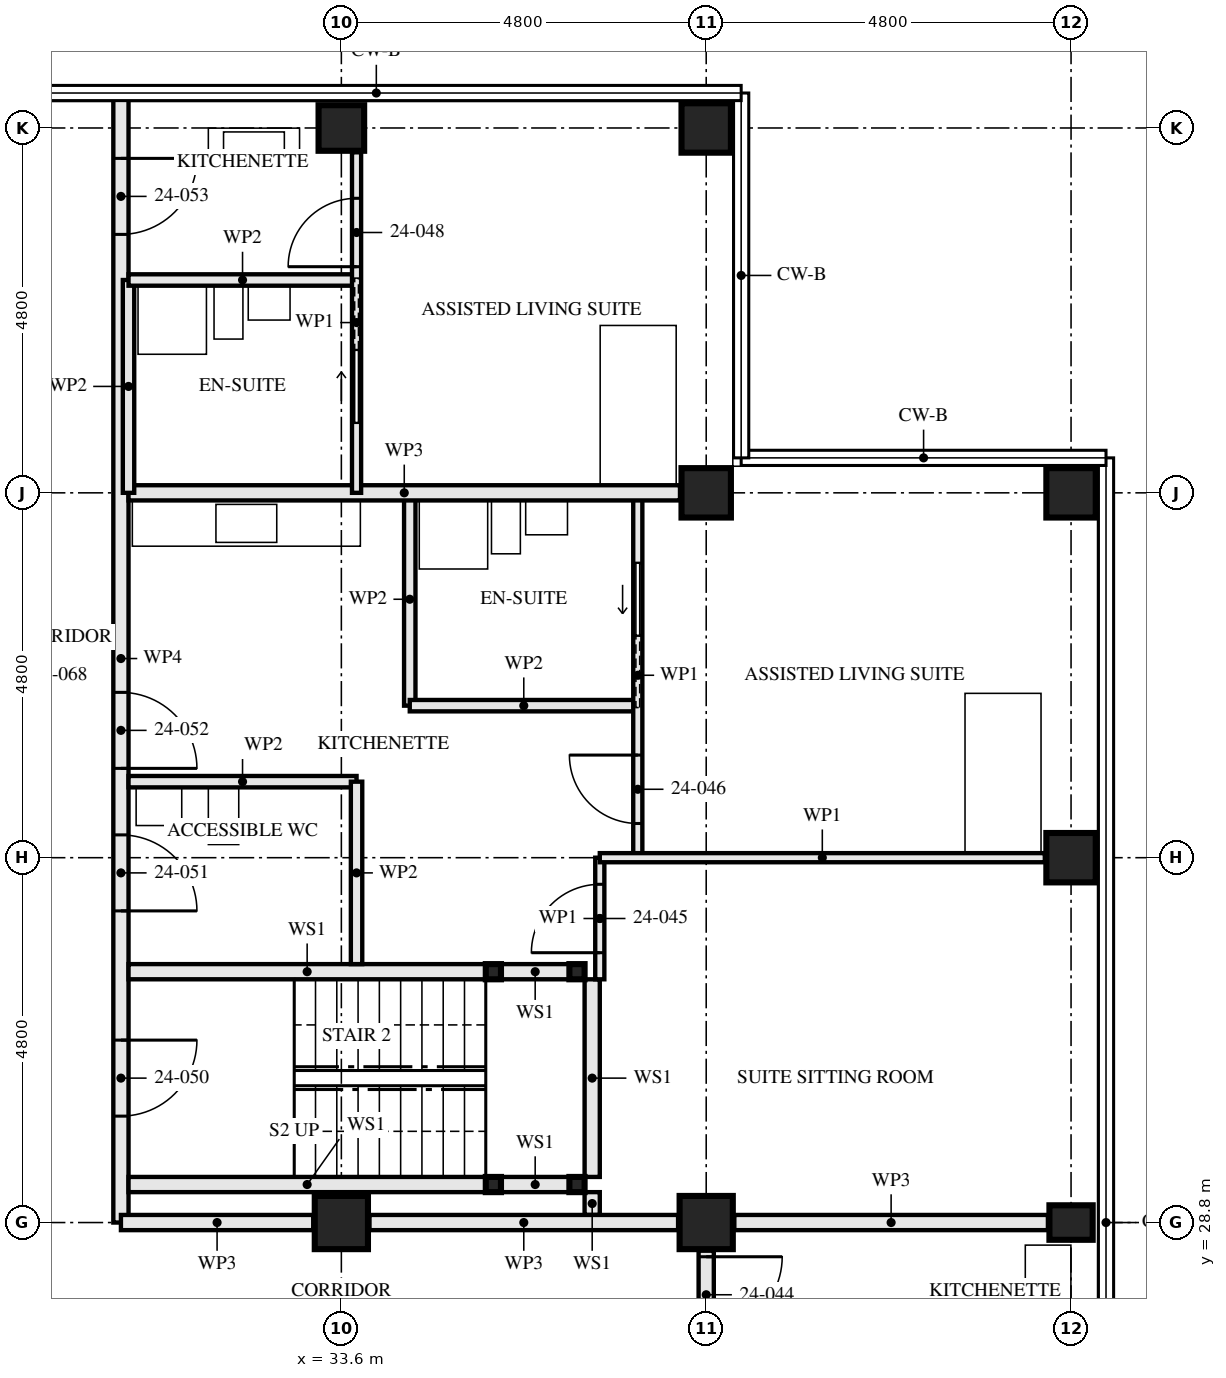
"""IFC4 building model, lengths in metres.
Left out: names, types, materials, properties, quantities, classifications, styles, units other than length and angle.
Written with IfcOpenShell. Run it as: python <this file> out.ifc"""

import sys

from ifc_helpers import new_model, si_unit, direction, frame, frame_2d, origin, origin_2d, place, context, subcontext, project, spatial, rectangle, hollow_rectangle, i_section, extrude, element, fill, save


model = new_model("IFC4")
c1 = context("Model", 3, precision=1e-05, world=origin(), true_north=direction((0.0, 1.0)))
c2 = subcontext(c1, "Body", "Model", "MODEL_VIEW")
j1 = project(units=[si_unit("LENGTHUNIT", "METRE"), si_unit("PLANEANGLEUNIT", "RADIAN")], contexts=[c1])
p1 = place(None, origin())
s1 = spatial("IfcSite", under=j1, at=p1, CompositionType="ELEMENT")
p2 = place(p1, origin())
s2 = spatial("IfcBuilding", under=s1, at=p2, CompositionType="ELEMENT")
p3 = place(p2, frame((0.0, 0.0, 91.0)))
s3 = spatial("IfcBuildingStorey", under=s2, at=p3, CompositionType="ELEMENT", Elevation=91.0)
p4 = place(p3, frame((33.6, 28.8, 0.0), z_axis=(0.0, 0.0, 1.0), x_axis=(0.0, 1.0, 0.0)))
e1 = element("IfcColumn", 1, at=p4, inside=s3, PredefinedType="COLUMN", context=c2, shape_type="SweptSolid", body=[
    extrude(hollow_rectangle(XDim=0.7, YDim=0.7, WallThickness=0.06, at=origin_2d()), origin(), (0.0, 0.0, 1.0), 3.5),
])
p5 = place(p3, frame((33.6, 43.2, 0.0), z_axis=(0.0, 0.0, 1.0), x_axis=(0.0, 1.0, 0.0)))
e2 = element("IfcColumn", 2, at=p5, inside=s3, PredefinedType="COLUMN", context=c2, shape_type="SweptSolid", body=[
    extrude(hollow_rectangle(XDim=0.6, YDim=0.6, WallThickness=0.08, at=origin_2d()), origin(), (0.0, 0.0, 1.0), 3.5),
])
p6 = place(p3, frame((38.4, 28.8, 0.0), z_axis=(0.0, 0.0, 1.0), x_axis=(0.0, 1.0, 0.0)))
e3 = element("IfcColumn", 3, at=p6, inside=s3, PredefinedType="COLUMN", context=c2, shape_type="SweptSolid", body=[
    extrude(hollow_rectangle(XDim=0.7, YDim=0.7, WallThickness=0.06, at=origin_2d()), origin(), (0.0, 0.0, 1.0), 3.5),
])
for number, where, z_axis, x_axis in (
    (4, (38.4, 38.4, 0.0), (0.0, 0.0, 1.0), (0.0, 1.0, 0.0)),
    (5, (38.4, 43.2, 0.0), (0.0, 0.0, 1.0), (0.0, 1.0, 0.0)),
):
    element("IfcColumn", number, at=place(p3, frame(where, z_axis=z_axis, x_axis=x_axis)), inside=s3, PredefinedType="COLUMN", context=c2, shape_type="SweptSolid", body=[
        extrude(hollow_rectangle(XDim=0.65, YDim=0.65, WallThickness=0.08, at=origin_2d()), origin(), (0.0, 0.0, 1.0), 3.5),
    ])
p7 = place(p3, frame((43.2, 28.8, 0.0), z_axis=(0.0, 0.0, 1.0), x_axis=(0.0, 1.0, 0.0)))
e6 = element("IfcColumn", 6, at=p7, inside=s3, PredefinedType="COLUMN", context=c2, shape_type="SweptSolid", body=[
    extrude(i_section(OverallWidth=0.454, OverallDepth=0.569, WebThickness=0.078, FlangeThickness=0.125, FilletRadius=0.015, at=origin_2d()), origin(), (0.0, 0.0, 1.0), 3.5),
])
for number, where, z_axis, x_axis in (
    (7, (43.2, 33.6, 0.0), (0.0, 0.0, 1.0), (1.0, 0.0, 0.0)),
    (8, (43.2, 38.4, 0.0), (0.0, 0.0, 1.0), (0.0, 1.0, 0.0)),
):
    element("IfcColumn", number, at=place(p3, frame(where, z_axis=z_axis, x_axis=x_axis)), inside=s3, PredefinedType="COLUMN", context=c2, shape_type="SweptSolid", body=[
        extrude(hollow_rectangle(XDim=0.65, YDim=0.65, WallThickness=0.08, at=origin_2d()), origin(), (0.0, 0.0, 1.0), 3.5),
    ])
for number, where, z_axis, x_axis in (
    (9, (36.7, 29.3, 0.0), (0.0, 0.0, 1.0), (1.0, 0.0, 0.0)),
    (10, (36.7, 32.1, 0.0), (0.0, 0.0, 1.0), (1.0, 0.0, 0.0)),
    (11, (35.6, 29.3, 0.0), (0.0, 0.0, 1.0), (1.0, 0.0, 0.0)),
    (12, (35.6, 32.1, 0.0), (0.0, 0.0, 1.0), (1.0, 0.0, 0.0)),
):
    element("IfcColumn", number, at=place(p3, frame(where, z_axis=z_axis, x_axis=x_axis)), inside=s3, PredefinedType="COLUMN", context=c2, shape_type="SweptSolid", body=[
        extrude(hollow_rectangle(XDim=0.2, YDim=0.2, WallThickness=0.008, at=origin_2d()), origin(), (0.0, 0.0, 1.0), 3.33),
    ])
p8 = place(p3, frame((38.4, 26.8, 0.0), z_axis=(0.0, 0.0, 1.0), x_axis=(0.0, 1.0, 0.0)))
e13 = element("IfcWall", 13, at=p8, inside=s3, PredefinedType="PARTITIONING", context=c2, shape_type="SweptSolid", body=[
    extrude(rectangle(XDim=1.63, YDim=0.2, at=frame_2d((0.815, 0.0))), origin(), (0.0, 0.0, 1.0), 3.33),
])
p9 = place(p8, frame((0.55, 0.0, 0.0)))
e14 = element("IfcOpeningElement", 14, at=p9, cuts=e13, PredefinedType="OPENING", context=c2, shape_type="SweptSolid", body=[
    extrude(rectangle(XDim=1.0, YDim=2.1, at=frame_2d((0.5, 1.05))), frame((0.0, 0.111, 0.0), z_axis=(0.0, -1.0, 0.0), x_axis=(1.0, 0.0, 0.0)), (0.0, 0.0, 1.0), 0.221),
])
p10 = place(p3, frame((36.6, 29.3, 0.0), z_axis=(0.0, 0.0, 1.0), x_axis=(-1.0, 0.0, 0.0)))
e15 = element("IfcWall", 15, at=p10, inside=s3, PredefinedType="SOLIDWALL", context=c2, shape_type="SweptSolid", body=[
    extrude(rectangle(XDim=0.9, YDim=0.2, at=frame_2d((0.45, 0.0))), origin(), (0.0, 0.0, 1.0), 2.99),
])
p11 = place(p3, frame((35.5, 29.3, 0.0), z_axis=(0.0, 0.0, 1.0), x_axis=(-1.0, 0.0, 0.0)))
e16 = element("IfcWall", 16, at=p11, inside=s3, PredefinedType="SOLIDWALL", context=c2, shape_type="SweptSolid", body=[
    extrude(rectangle(XDim=4.7, YDim=0.2, at=frame_2d((2.35, 0.0))), origin(), (0.0, 0.0, 1.0), 2.99),
])
p12 = place(p3, frame((36.6, 32.1, 0.0), z_axis=(0.0, 0.0, 1.0), x_axis=(-1.0, 0.0, 0.0)))
e17 = element("IfcWall", 17, at=p12, inside=s3, PredefinedType="SOLIDWALL", context=c2, shape_type="SweptSolid", body=[
    extrude(rectangle(XDim=0.9, YDim=0.2, at=frame_2d((0.45, 0.0))), origin(), (0.0, 0.0, 1.0), 2.99),
])
p13 = place(p3, frame((35.5, 32.1, 0.0), z_axis=(0.0, 0.0, 1.0), x_axis=(-1.0, 0.0, 0.0)))
e18 = element("IfcWall", 18, at=p13, inside=s3, PredefinedType="SOLIDWALL", context=c2, shape_type="SweptSolid", body=[
    extrude(rectangle(XDim=4.7, YDim=0.2, at=frame_2d((2.35, 0.0))), origin(), (0.0, 0.0, 1.0), 2.99),
])
p14 = place(p3, frame((36.9, 28.9, 0.0), z_axis=(0.0, 0.0, 1.0), x_axis=(0.0, 1.0, 0.0)))
e19 = element("IfcWall", 19, at=p14, inside=s3, PredefinedType="SOLIDWALL", context=c2, shape_type="SweptSolid", body=[
    extrude(rectangle(XDim=0.3, YDim=0.2, at=frame_2d((0.15, 0.0))), origin(), (0.0, 0.0, 1.0), 3.33),
])
p15 = place(p3, frame((36.9, 29.4, 0.0), z_axis=(0.0, 0.0, 1.0), x_axis=(0.0, 1.0, 0.0)))
e20 = element("IfcWall", 20, at=p15, inside=s3, PredefinedType="SOLIDWALL", context=c2, shape_type="SweptSolid", body=[
    extrude(rectangle(XDim=2.6, YDim=0.2, at=frame_2d((1.3, 0.0))), origin(), (0.0, 0.0, 1.0), 3.33),
])
p16 = place(p3, frame((33.8, 32.2, 0.0), z_axis=(0.0, 0.0, 1.0), x_axis=(0.0, 1.0, 0.0)))
e21 = element("IfcWall", 21, at=p16, inside=s3, PredefinedType="PARTITIONING", context=c2, shape_type="SweptSolid", body=[
    extrude(rectangle(XDim=2.4, YDim=0.15, at=frame_2d((1.2, 0.0))), origin(), (0.0, 0.0, 1.0), 2.55),
])
for number, where, z_axis, x_axis in (
    (22, (33.8, 34.6, 0.0), (0.0, 0.0, 1.0), (-1.0, 0.0, 0.0)),
    (23, (37.5, 35.6, 0.0), (0.0, 0.0, 1.0), (-1.0, 0.0, 0.0)),
):
    element("IfcWall", number, at=place(p3, frame(where, z_axis=z_axis, x_axis=x_axis)), inside=s3, PredefinedType="PARTITIONING", context=c2, shape_type="SweptSolid", body=[
        extrude(rectangle(XDim=3.0, YDim=0.15, at=frame_2d((1.5, 0.0))), origin(), (0.0, 0.0, 1.0), 3.33),
    ])
p17 = place(p3, frame((34.5, 35.6, 0.0), z_axis=(0.0, 0.0, 1.0), x_axis=(0.0, 1.0, 0.0)))
e24 = element("IfcWall", 24, at=p17, inside=s3, PredefinedType="PARTITIONING", context=c2, shape_type="SweptSolid", body=[
    extrude(rectangle(XDim=2.8, YDim=0.15, at=frame_2d((1.4, 0.0))), origin(), (0.0, 0.0, 1.0), 3.33),
])
p18 = place(p3, frame((37.0, 32.0, 0.0), z_axis=(0.0, 0.0, 1.0), x_axis=(0.0, 1.0, 0.0)))
e25 = element("IfcWall", 25, at=p18, inside=s3, PredefinedType="PARTITIONING", context=c2, shape_type="SweptSolid", body=[
    extrude(rectangle(XDim=1.6, YDim=0.12, at=frame_2d((0.8, 0.0))), origin(), (0.0, 0.0, 1.0), 3.33),
])
p19 = place(p18, frame((0.35, 0.0, 0.0)))
e26 = element("IfcOpeningElement", 26, at=p19, cuts=e25, PredefinedType="OPENING", context=c2, shape_type="SweptSolid", body=[
    extrude(rectangle(XDim=0.9, YDim=2.1, at=frame_2d((0.45, 1.05))), frame((0.0, 0.071, 0.0), z_axis=(0.0, -1.0, 0.0), x_axis=(1.0, 0.0, 0.0)), (0.0, 0.0, 1.0), 0.141),
])
p20 = place(p3, frame((37.5, 33.6, 0.0), z_axis=(0.0, 0.0, 1.0), x_axis=(0.0, 1.0, 0.0)))
e27 = element("IfcWall", 27, at=p20, inside=s3, PredefinedType="PARTITIONING", context=c2, shape_type="SweptSolid", body=[
    extrude(rectangle(XDim=4.8, YDim=0.12, at=frame_2d((2.4, 0.0))), origin(), (0.0, 0.0, 1.0), 3.33),
])
p21 = place(p20, frame((0.45, 0.0, 0.0)))
e28 = element("IfcOpeningElement", 28, at=p21, cuts=e27, PredefinedType="OPENING", context=c2, shape_type="SweptSolid", body=[
    extrude(rectangle(XDim=0.9, YDim=2.1, at=frame_2d((0.45, 1.05))), frame((0.0, 0.071, 0.0), z_axis=(0.0, -1.0, 0.0), x_axis=(1.0, 0.0, 0.0)), (0.0, 0.0, 1.0), 0.141),
])
p22 = place(p20, frame((2.925, 0.0, 0.0)))
e29 = element("IfcOpeningElement", 29, at=p22, cuts=e27, PredefinedType="OPENING", context=c2, shape_type="SweptSolid", body=[
    extrude(rectangle(XDim=0.95, YDim=2.1, at=frame_2d((0.475, 1.05))), frame((0.0, 0.071, 0.0), z_axis=(0.0, -1.0, 0.0), x_axis=(1.0, 0.0, 0.0)), (0.0, 0.0, 1.0), 0.141),
])
p23 = place(p3, frame((42.855, 33.6, 0.0), z_axis=(0.0, 0.0, 1.0), x_axis=(-1.0, 0.0, 0.0)))
e30 = element("IfcWall", 30, at=p23, inside=s3, PredefinedType="PARTITIONING", context=c2, shape_type="SweptSolid", body=[
    extrude(rectangle(XDim=5.855, YDim=0.12, at=frame_2d((2.927, 0.0))), origin(), (0.0, 0.0, 1.0), 2.55),
])
p24 = place(p3, frame((38.055, 38.4, 0.0), z_axis=(0.0, 0.0, 1.0), x_axis=(-1.0, 0.0, 0.0)))
e31 = element("IfcWall", 31, at=p24, inside=s3, PredefinedType="PARTITIONING", context=c2, shape_type="SweptSolid", body=[
    extrude(rectangle(XDim=7.255, YDim=0.2, at=frame_2d((3.627, 0.0))), origin(), (0.0, 0.0, 1.0), 2.55),
])
p25 = place(p3, frame((33.8, 41.2, 0.0), z_axis=(0.0, 0.0, 1.0), x_axis=(-1.0, 0.0, 0.0)))
e32 = element("IfcWall", 32, at=p25, inside=s3, PredefinedType="PARTITIONING", context=c2, shape_type="SweptSolid", body=[
    extrude(rectangle(XDim=3.0, YDim=0.15, at=frame_2d((1.5, 0.0))), origin(), (0.0, 0.0, 1.0), 3.33),
])
p26 = place(p3, frame((30.8, 38.4, 0.0), z_axis=(0.0, 0.0, 1.0), x_axis=(0.0, 1.0, 0.0)))
e33 = element("IfcWall", 33, at=p26, inside=s3, PredefinedType="PARTITIONING", context=c2, shape_type="SweptSolid", body=[
    extrude(rectangle(XDim=2.8, YDim=0.15, at=frame_2d((1.4, 0.0))), origin(), (0.0, 0.0, 1.0), 3.33),
])
p27 = place(p3, frame((33.8, 38.4, 0.0), z_axis=(0.0, 0.0, 1.0), x_axis=(0.0, 1.0, 0.0)))
e34 = element("IfcWall", 34, at=p27, inside=s3, PredefinedType="PARTITIONING", context=c2, shape_type="SweptSolid", body=[
    extrude(rectangle(XDim=4.48, YDim=0.12, at=frame_2d((2.24, 0.0))), origin(), (0.0, 0.0, 1.0), 3.33),
])
p28 = place(p27, frame((2.975, 0.0, 0.0)))
e35 = element("IfcOpeningElement", 35, at=p28, cuts=e34, PredefinedType="OPENING", context=c2, shape_type="SweptSolid", body=[
    extrude(rectangle(XDim=0.9, YDim=2.1, at=frame_2d((0.45, 1.05))), frame((0.0, 0.071, 0.0), z_axis=(0.0, -1.0, 0.0), x_axis=(1.0, 0.0, 0.0)), (0.0, 0.0, 1.0), 0.141),
])
p29 = place(p27, frame((0.925, 0.0, 0.0)))
e36 = element("IfcOpeningElement", 36, at=p29, cuts=e34, PredefinedType="OPENING", context=c2, shape_type="SweptSolid", body=[
    extrude(rectangle(XDim=0.95, YDim=2.1, at=frame_2d((0.475, 1.05))), frame((0.0, 0.071, 0.0), z_axis=(0.0, -1.0, 0.0), x_axis=(1.0, 0.0, 0.0)), (0.0, 0.0, 1.0), 0.141),
])
p30 = place(p3, frame((30.7, 28.8, 0.0), z_axis=(0.0, 0.0, 1.0), x_axis=(0.0, 1.0, 0.0)))
e37 = element("IfcWall", 37, at=p30, inside=s3, PredefinedType="PARTITIONING", context=c2, shape_type="SweptSolid", body=[
    extrude(rectangle(XDim=14.84, YDim=0.2, at=frame_2d((7.42, 0.0))), origin(), (0.0, 0.0, 1.0), 2.32),
])
p31 = place(p30, frame((1.4, 0.0, 0.0)))
e38 = element("IfcOpeningElement", 38, at=p31, cuts=e37, PredefinedType="OPENING", context=c2, shape_type="SweptSolid", body=[
    extrude(rectangle(XDim=1.0, YDim=2.1, at=frame_2d((0.5, 1.05))), frame((0.0, 0.111, 0.0), z_axis=(0.0, -1.0, 0.0), x_axis=(1.0, 0.0, 0.0)), (0.0, 0.0, 1.0), 0.221),
])
p32 = place(p30, frame((4.1, 0.0, 0.0)))
e39 = element("IfcOpeningElement", 39, at=p32, cuts=e37, PredefinedType="OPENING", context=c2, shape_type="SweptSolid", body=[
    extrude(rectangle(XDim=1.0, YDim=2.1, at=frame_2d((0.5, 1.05))), frame((0.0, 0.111, 0.0), z_axis=(0.0, -1.0, 0.0), x_axis=(1.0, 0.0, 0.0)), (0.0, 0.0, 1.0), 0.221),
])
p33 = place(p30, frame((5.975, 0.0, 0.0)))
e40 = element("IfcOpeningElement", 40, at=p33, cuts=e37, PredefinedType="OPENING", context=c2, shape_type="SweptSolid", body=[
    extrude(rectangle(XDim=1.0, YDim=2.1, at=frame_2d((0.5, 1.05))), frame((0.0, 0.111, 0.0), z_axis=(0.0, -1.0, 0.0), x_axis=(1.0, 0.0, 0.0)), (0.0, 0.0, 1.0), 0.221),
])
p34 = place(p30, frame((13.0, 0.0, 0.0)))
e41 = element("IfcOpeningElement", 41, at=p34, cuts=e37, PredefinedType="OPENING", context=c2, shape_type="SweptSolid", body=[
    extrude(rectangle(XDim=1.0, YDim=2.1, at=frame_2d((0.5, 1.05))), frame((0.0, 0.111, 0.0), z_axis=(0.0, -1.0, 0.0), x_axis=(1.0, 0.0, 0.0)), (0.0, 0.0, 1.0), 0.221),
])
p35 = place(p3, frame((42.896, 28.8, 0.0), z_axis=(0.0, 0.0, 1.0), x_axis=(-1.0, 0.0, 0.0)))
e42 = element("IfcWall", 42, at=p35, inside=s3, PredefinedType="PARTITIONING", context=c2, shape_type="SweptSolid", body=[
    extrude(rectangle(XDim=4.125, YDim=0.2, at=frame_2d((2.063, 0.0))), origin(), (0.0, 0.0, 1.0), 2.32),
])
p36 = place(p3, frame((38.03, 28.8, 0.0), z_axis=(0.0, 0.0, 1.0), x_axis=(-1.0, 0.0, 0.0)))
e43 = element("IfcWall", 43, at=p36, inside=s3, PredefinedType="PARTITIONING", context=c2, shape_type="SweptSolid", body=[
    extrude(rectangle(XDim=4.06, YDim=0.2, at=frame_2d((2.03, 0.0))), origin(), (0.0, 0.0, 1.0), 2.32),
])
p37 = place(p3, frame((33.23, 28.8, 0.0), z_axis=(0.0, 0.0, 1.0), x_axis=(-1.0, 0.0, 0.0)))
e44 = element("IfcWall", 44, at=p37, inside=s3, PredefinedType="PARTITIONING", context=c2, shape_type="SweptSolid", body=[
    extrude(rectangle(XDim=2.53, YDim=0.2, at=frame_2d((1.265, 0.0))), origin(), (0.0, 0.0, 1.0), 2.32),
])
p38 = place(p9, frame((1.0, 0.0, 0.0), z_axis=(0.0, 0.0, 1.0), x_axis=(-1.0, 0.0, 0.0)))
e45 = element("IfcDoor", 45, at=p38, inside=s3, OperationType="SINGLE_SWING_RIGHT", PredefinedType="DOOR", context=c2, shape_type="SweptSolid", body=[
    extrude(rectangle(XDim=1.0, YDim=2.1, at=frame_2d((0.5, 1.05))), frame((0.0, 0.027, 0.0), z_axis=(0.0, -1.0, 0.0), x_axis=(1.0, 0.0, 0.0)), (0.0, 0.0, 1.0), 0.054),
])
fill(e14, e45)
p39 = place(p19, origin())
e46 = element("IfcDoor", 46, at=p39, inside=s3, OperationType="SINGLE_SWING_RIGHT", PredefinedType="DOOR", context=c2, shape_type="SweptSolid", body=[
    extrude(rectangle(XDim=0.9, YDim=2.1, at=frame_2d((0.45, 1.05))), frame((0.0, 0.022, 0.0), z_axis=(0.0, -1.0, 0.0), x_axis=(1.0, 0.0, 0.0)), (0.0, 0.0, 1.0), 0.044),
])
fill(e26, e46)
p40 = place(p21, origin())
e47 = element("IfcDoor", 47, at=p40, inside=s3, OperationType="SINGLE_SWING_LEFT", PredefinedType="DOOR", context=c2, shape_type="SweptSolid", body=[
    extrude(rectangle(XDim=0.9, YDim=2.1, at=frame_2d((0.45, 1.05))), frame((0.0, 0.022, 0.0), z_axis=(0.0, -1.0, 0.0), x_axis=(1.0, 0.0, 0.0)), (0.0, 0.0, 1.0), 0.044),
])
fill(e28, e47)
p41 = place(p22, origin())
e48 = element("IfcDoor", 48, at=p41, inside=s3, OperationType="SLIDING_TO_RIGHT", PredefinedType="DOOR", context=c2, shape_type="SweptSolid", body=[
    extrude(rectangle(XDim=0.95, YDim=2.1, at=frame_2d((0.475, 1.05))), frame((0.0, 0.022, 0.0), z_axis=(0.0, -1.0, 0.0), x_axis=(1.0, 0.0, 0.0)), (0.0, 0.0, 1.0), 0.044),
])
fill(e29, e48)
p42 = place(p28, origin())
e49 = element("IfcDoor", 49, at=p42, inside=s3, OperationType="SINGLE_SWING_RIGHT", PredefinedType="DOOR", context=c2, shape_type="SweptSolid", body=[
    extrude(rectangle(XDim=0.9, YDim=2.1, at=frame_2d((0.45, 1.05))), frame((0.0, 0.022, 0.0), z_axis=(0.0, -1.0, 0.0), x_axis=(1.0, 0.0, 0.0)), (0.0, 0.0, 1.0), 0.044),
])
fill(e35, e49)
p43 = place(p29, origin())
e50 = element("IfcDoor", 50, at=p43, inside=s3, OperationType="SLIDING_TO_LEFT", PredefinedType="DOOR", context=c2, shape_type="SweptSolid", body=[
    extrude(rectangle(XDim=0.95, YDim=2.1, at=frame_2d((0.475, 1.05))), frame((0.0, 0.022, 0.0), z_axis=(0.0, -1.0, 0.0), x_axis=(1.0, 0.0, 0.0)), (0.0, 0.0, 1.0), 0.044),
])
fill(e36, e50)
p44 = place(p31, frame((1.0, 0.0, 0.0), z_axis=(0.0, 0.0, 1.0), x_axis=(-1.0, 0.0, 0.0)))
e51 = element("IfcDoor", 51, at=p44, inside=s3, OperationType="SINGLE_SWING_RIGHT", PredefinedType="DOOR", context=c2, shape_type="SweptSolid", body=[
    extrude(rectangle(XDim=1.0, YDim=2.1, at=frame_2d((0.5, 1.05))), frame((0.0, 0.032, 0.0), z_axis=(0.0, -1.0, 0.0), x_axis=(1.0, 0.0, 0.0)), (0.0, 0.0, 1.0), 0.064),
])
fill(e38, e51)
p45 = place(p32, frame((1.0, 0.0, 0.0), z_axis=(0.0, 0.0, 1.0), x_axis=(-1.0, 0.0, 0.0)))
e52 = element("IfcDoor", 52, at=p45, inside=s3, OperationType="SINGLE_SWING_LEFT", PredefinedType="DOOR", context=c2, shape_type="SweptSolid", body=[
    extrude(rectangle(XDim=1.0, YDim=2.1, at=frame_2d((0.5, 1.05))), frame((0.0, 0.027, 0.0), z_axis=(0.0, -1.0, 0.0), x_axis=(1.0, 0.0, 0.0)), (0.0, 0.0, 1.0), 0.054),
])
fill(e39, e52)
p46 = place(p33, frame((1.0, 0.0, 0.0), z_axis=(0.0, 0.0, 1.0), x_axis=(-1.0, 0.0, 0.0)))
e53 = element("IfcDoor", 53, at=p46, inside=s3, OperationType="SINGLE_SWING_LEFT", PredefinedType="DOOR", context=c2, shape_type="SweptSolid", body=[
    extrude(rectangle(XDim=1.0, YDim=2.1, at=frame_2d((0.5, 1.05))), frame((0.0, 0.027, 0.0), z_axis=(0.0, -1.0, 0.0), x_axis=(1.0, 0.0, 0.0)), (0.0, 0.0, 1.0), 0.054),
])
fill(e40, e53)
p47 = place(p34, frame((1.0, 0.0, 0.0), z_axis=(0.0, 0.0, 1.0), x_axis=(-1.0, 0.0, 0.0)))
e54 = element("IfcDoor", 54, at=p47, inside=s3, OperationType="SINGLE_SWING_RIGHT", PredefinedType="DOOR", context=c2, shape_type="SweptSolid", body=[
    extrude(rectangle(XDim=1.0, YDim=2.1, at=frame_2d((0.5, 1.05))), frame((0.0, 0.027, 0.0), z_axis=(0.0, -1.0, 0.0), x_axis=(1.0, 0.0, 0.0)), (0.0, 0.0, 1.0), 0.054),
])
fill(e41, e54)
save(model, sys.argv[1])
